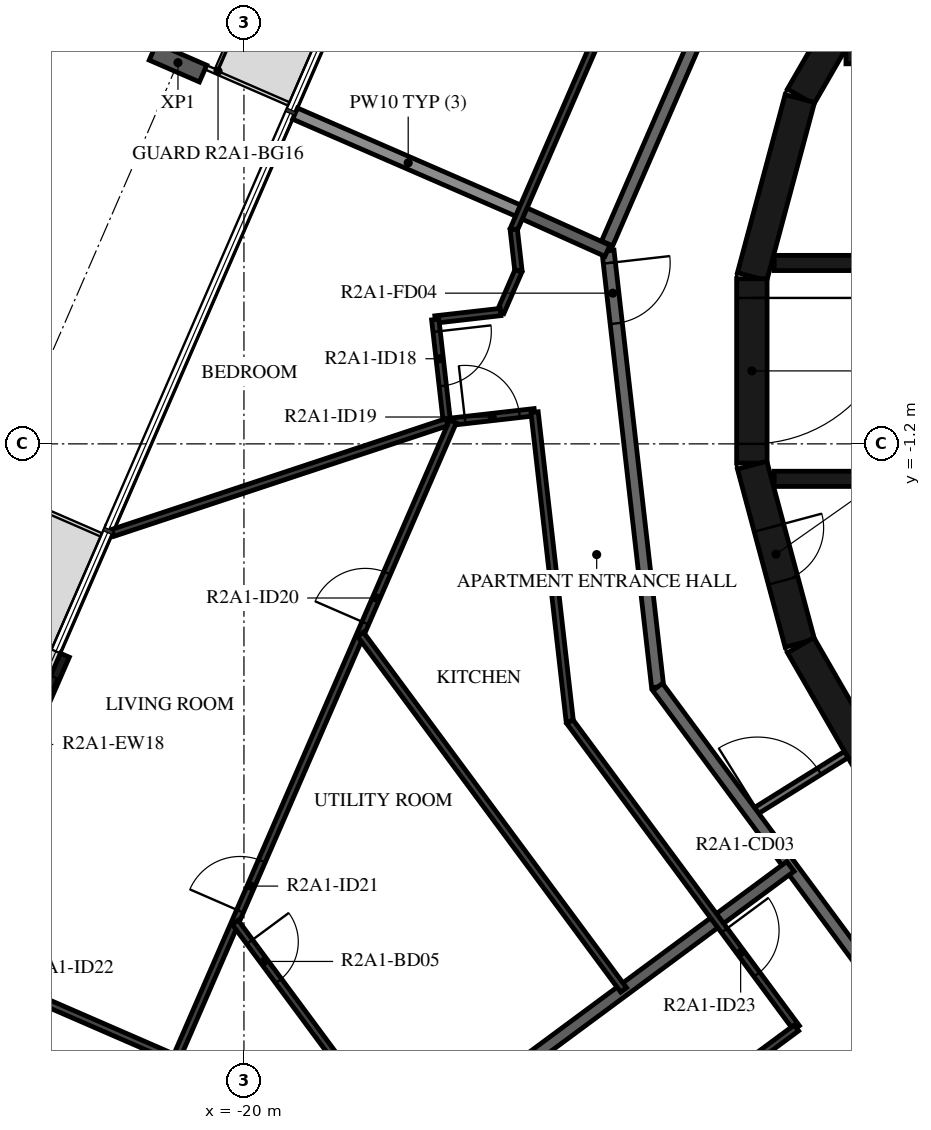
"""IFC4 building model, lengths in metres.
Left out: names, types, materials, properties, quantities, classifications, styles, units other than length and angle.
Written with IfcOpenShell. Run it as: python <this file> out.ifc"""

import sys

from ifc_helpers import new_model, si_unit, direction, frame, frame_2d, origin, origin_2d, place, context, subcontext, project, spatial, rectangle, i_section, extrude, element, fill, save


model = new_model("IFC4")
c1 = context("Model", 3, precision=1e-05, world=origin(), true_north=direction((0.0, 1.0)))
c2 = subcontext(c1, "Body", "Model", "MODEL_VIEW")
j1 = project(units=[si_unit("LENGTHUNIT", "METRE"), si_unit("PLANEANGLEUNIT", "RADIAN")], contexts=[c1])
p1 = place(None, origin())
s1 = spatial("IfcSite", under=j1, at=p1, CompositionType="ELEMENT")
p2 = place(p1, origin())
s2 = spatial("IfcBuilding", under=s1, at=p2, CompositionType="ELEMENT")
p3 = place(p2, frame((0.0, 0.0, 80.2)))
s3 = spatial("IfcBuildingStorey", under=s2, at=p3, CompositionType="ELEMENT", Elevation=80.2)
p4 = place(p3, frame((-21.085, 5.069, -0.38), z_axis=(0.0, 0.0, 1.0), x_axis=(0.398749038162, 0.917060087761, 0.0)))
e1 = element("IfcColumn", 1, at=p4, inside=s3, PredefinedType="COLUMN", context=c2, shape_type="SweptSolid", body=[
    extrude(i_section(OverallWidth=0.3, OverallDepth=0.9, WebThickness=0.019, FlangeThickness=0.035, FilletRadius=0.03, at=origin_2d()), origin(), (0.0, 0.0, 1.0), 3.5),
])
p5 = place(p3, frame((-22.945, -4.676, 0.0), z_axis=(0.0, 0.0, 1.0), x_axis=(-0.398784695066, -0.917044582876, 0.0)))
e2 = element("IfcWall", 2, at=p5, inside=s3, PredefinedType="STANDARD", context=c2, shape_type="SweptSolid", body=[
    extrude(rectangle(XDim=3.2, YDim=0.16, at=frame_2d((1.6, 0.0))), origin(), (0.0, 0.0, 1.0), 3.12),
])
p6 = place(p5, frame((0.4, 0.0, 0.0)))
e3 = element("IfcOpeningElement", 3, at=p6, cuts=e2, PredefinedType="OPENING", context=c2, shape_type="SweptSolid", body=[
    extrude(rectangle(XDim=2.4, YDim=2.4, at=frame_2d((1.2, 1.2))), frame((0.0, 0.09, 0.0), z_axis=(0.0, -1.0, 0.0), x_axis=(1.0, 0.0, 0.0)), (0.0, 0.0, 1.0), 0.18),
])
for number, where, z_axis, x_axis in (
    (4, (-9.329, 7.137, 0.0), (0.0, 0.0, 1.0), (-0.5, -0.866, 0.0)),
    (5, (-10.858, 4.479, 0.0), (0.0, 0.0, 1.0), (-0.259, -0.966, 0.0)),
):
    element("IfcWall", number, at=place(p3, frame(where, z_axis=z_axis, x_axis=x_axis)), inside=s3, PredefinedType="SHEAR", context=c2, shape_type="SweptSolid", body=[
        extrude(rectangle(XDim=3.033, YDim=0.5, at=frame_2d((1.516, 0.0))), origin(), (0.0, 0.0, 1.0), 3.12),
    ])
p7 = place(p3, frame((-11.647, 1.516, 0.0), z_axis=(0.0, 0.0, 1.0), x_axis=(0.0, -1.0, 0.0)))
e6 = element("IfcWall", 6, at=p7, inside=s3, PredefinedType="SHEAR", context=c2, shape_type="SweptSolid", body=[
    extrude(rectangle(XDim=3.033, YDim=0.5, at=frame_2d((1.516, 0.0))), origin(), (0.0, 0.0, 1.0), 3.12),
])
p8 = place(p7, frame((0.316, 0.0, 0.0)))
e7 = element("IfcOpeningElement", 7, at=p8, cuts=e6, PredefinedType="OPENING", context=c2, shape_type="SweptSolid", body=[
    extrude(rectangle(XDim=2.4, YDim=2.1, at=frame_2d((1.2, 1.05))), frame((0.0, 0.26, 0.0), z_axis=(0.0, -1.0, 0.0), x_axis=(1.0, 0.0, 0.0)), (0.0, 0.0, 1.0), 0.52),
])
p9 = place(p3, frame((-11.643, -1.55, 0.0), z_axis=(0.0, 0.0, 1.0), x_axis=(0.258734743916, -0.965948410781, 0.0)))
e8 = element("IfcWall", 8, at=p9, inside=s3, PredefinedType="SHEAR", context=c2, shape_type="SweptSolid", body=[
    extrude(rectangle(XDim=3.033, YDim=0.5, at=frame_2d((1.516, 0.0))), origin(), (0.0, 0.0, 1.0), 3.12),
])
p10 = place(p9, frame((1.066, 0.0, 0.0)))
e9 = element("IfcOpeningElement", 9, at=p10, cuts=e8, PredefinedType="OPENING", context=c2, shape_type="SweptSolid", body=[
    extrude(rectangle(XDim=0.9, YDim=2.1, at=frame_2d((0.45, 1.05))), frame((0.0, 0.26, 0.0), z_axis=(0.0, -1.0, 0.0), x_axis=(1.0, 0.0, 0.0)), (0.0, 0.0, 1.0), 0.52),
])
p11 = place(p3, frame((-10.845, -4.51, 0.0), z_axis=(0.0, 0.0, 1.0), x_axis=(0.500087131594, -0.865975092491, 0.0)))
e10 = element("IfcWall", 10, at=p11, inside=s3, PredefinedType="SHEAR", context=c2, shape_type="SweptSolid", body=[
    extrude(rectangle(XDim=3.033, YDim=0.5, at=frame_2d((1.516, 0.0))), origin(), (0.0, 0.0, 1.0), 3.12),
])
p12 = place(p3, frame((-7.0, 5.175, 0.0), z_axis=(0.0, 0.0, 1.0), x_axis=(-1.0, 0.0, 0.0)))
e11 = element("IfcWall", 11, at=p12, inside=s3, PredefinedType="SHEAR", context=c2, shape_type="SweptSolid", body=[
    extrude(rectangle(XDim=3.1, YDim=0.25, at=frame_2d((1.55, 0.0))), origin(), (0.0, 0.0, 1.0), 3.12),
])
p13 = place(p3, frame((-11.28, 1.775, 0.0), z_axis=(0.0, 0.0, 1.0), x_axis=(1.0, 0.0, 0.0)))
e12 = element("IfcWall", 12, at=p13, inside=s3, PredefinedType="SHEAR", context=c2, shape_type="SweptSolid", body=[
    extrude(rectangle(XDim=14.38, YDim=0.25, at=frame_2d((7.19, 0.0))), origin(), (0.0, 0.0, 1.0), 3.12),
])
p14 = place(p13, frame((2.13, 0.0, 0.0)))
e13 = element("IfcOpeningElement", 13, at=p14, cuts=e12, PredefinedType="OPENING", context=c2, shape_type="SweptSolid", body=[
    extrude(rectangle(XDim=1.1, YDim=2.1, at=frame_2d((0.55, 1.05))), frame((0.0, 0.135, 0.0), z_axis=(0.0, -1.0, 0.0), x_axis=(1.0, 0.0, 0.0)), (0.0, 0.0, 1.0), 0.27),
])
p15 = place(p13, frame((4.28, 0.0, 0.0)))
e14 = element("IfcOpeningElement", 14, at=p15, cuts=e12, PredefinedType="OPENING", context=c2, shape_type="SweptSolid", body=[
    extrude(rectangle(XDim=1.1, YDim=2.1, at=frame_2d((0.55, 1.05))), frame((0.0, 0.135, 0.0), z_axis=(0.0, -1.0, 0.0), x_axis=(1.0, 0.0, 0.0)), (0.0, 0.0, 1.0), 0.27),
])
p16 = place(p13, frame((6.43, 0.0, 0.0)))
e15 = element("IfcOpeningElement", 15, at=p16, cuts=e12, PredefinedType="OPENING", context=c2, shape_type="SweptSolid", body=[
    extrude(rectangle(XDim=1.1, YDim=2.1, at=frame_2d((0.55, 1.05))), frame((0.0, 0.135, 0.0), z_axis=(0.0, -1.0, 0.0), x_axis=(1.0, 0.0, 0.0)), (0.0, 0.0, 1.0), 0.27),
])
p17 = place(p13, frame((8.58, 0.0, 0.0)))
e16 = element("IfcOpeningElement", 16, at=p17, cuts=e12, PredefinedType="OPENING", context=c2, shape_type="SweptSolid", body=[
    extrude(rectangle(XDim=1.1, YDim=2.1, at=frame_2d((0.55, 1.05))), frame((0.0, 0.135, 0.0), z_axis=(0.0, -1.0, 0.0), x_axis=(1.0, 0.0, 0.0)), (0.0, 0.0, 1.0), 0.27),
])
p18 = place(p13, frame((11.905, 0.0, 0.0)))
e17 = element("IfcOpeningElement", 17, at=p18, cuts=e12, PredefinedType="OPENING", context=c2, shape_type="SweptSolid", body=[
    extrude(rectangle(XDim=0.9, YDim=2.1, at=frame_2d((0.45, 1.05))), frame((0.0, 0.135, 0.0), z_axis=(0.0, -1.0, 0.0), x_axis=(1.0, 0.0, 0.0)), (0.0, 0.0, 1.0), 0.27),
])
p19 = place(p3, frame((-11.28, -1.775, 0.0), z_axis=(0.0, 0.0, 1.0), x_axis=(1.0, 0.0, 0.0)))
e18 = element("IfcWall", 18, at=p19, inside=s3, PredefinedType="SHEAR", context=c2, shape_type="SweptSolid", body=[
    extrude(rectangle(XDim=14.38, YDim=0.25, at=frame_2d((7.19, 0.0))), origin(), (0.0, 0.0, 1.0), 3.12),
])
p20 = place(p19, frame((7.605, 0.0, 0.0)))
e19 = element("IfcOpeningElement", 19, at=p20, cuts=e18, PredefinedType="OPENING", context=c2, shape_type="SweptSolid", body=[
    extrude(rectangle(XDim=0.9, YDim=2.1, at=frame_2d((0.45, 1.05))), frame((0.0, 0.135, 0.0), z_axis=(0.0, -1.0, 0.0), x_axis=(1.0, 0.0, 0.0)), (0.0, 0.0, 1.0), 0.27),
])
p21 = place(p19, frame((10.83, 0.0, 0.0)))
e20 = element("IfcOpeningElement", 20, at=p21, cuts=e18, PredefinedType="OPENING", context=c2, shape_type="SweptSolid", body=[
    extrude(rectangle(XDim=0.9, YDim=2.1, at=frame_2d((0.45, 1.05))), frame((0.0, 0.135, 0.0), z_axis=(0.0, -1.0, 0.0), x_axis=(1.0, 0.0, 0.0)), (0.0, 0.0, 1.0), 0.27),
])
p22 = place(p19, frame((12.98, 0.0, 0.0)))
e21 = element("IfcOpeningElement", 21, at=p22, cuts=e18, PredefinedType="OPENING", context=c2, shape_type="SweptSolid", body=[
    extrude(rectangle(XDim=0.9, YDim=2.1, at=frame_2d((0.45, 1.05))), frame((0.0, 0.135, 0.0), z_axis=(0.0, -1.0, 0.0), x_axis=(1.0, 0.0, 0.0)), (0.0, 0.0, 1.0), 0.27),
])
p23 = place(p3, frame((-11.654, -7.282, 0.0), z_axis=(0.0, 0.0, 1.0), x_axis=(0.848117698675, 0.529807860638, 0.0)))
e22 = element("IfcWall", 22, at=p23, inside=s3, PredefinedType="PARTITIONING", context=c2, shape_type="SweptSolid", body=[
    extrude(rectangle(XDim=1.838, YDim=0.12, at=frame_2d((0.919, 0.0))), origin(), (0.0, 0.0, 1.0), 3.12),
])
p24 = place(p23, frame((0.115, 0.0, 0.0)))
e23 = element("IfcOpeningElement", 23, at=p24, cuts=e22, PredefinedType="OPENING", context=c2, shape_type="SweptSolid", body=[
    extrude(rectangle(XDim=1.2, YDim=2.1, at=frame_2d((0.6, 1.05))), frame((0.0, 0.07, 0.0), z_axis=(0.0, -1.0, 0.0), x_axis=(1.0, 0.0, 0.0)), (0.0, 0.0, 1.0), 0.14),
])
p25 = place(p3, frame((-11.1, 8.829, 0.0), z_axis=(0.0, 0.0, 1.0), x_axis=(-0.398741918631, -0.917063183388, 0.0)))
e24 = element("IfcWall", 24, at=p25, inside=s3, PredefinedType="STANDARD", context=c2, shape_type="SweptSolid", body=[
    extrude(rectangle(XDim=7.342, YDim=0.2, at=frame_2d((3.671, 0.0))), origin(), (0.0, 0.0, 1.0), 3.12),
])
p26 = place(p3, frame((-14.013, 1.974, 0.0), z_axis=(0.0, 0.0, 1.0), x_axis=(0.113196526349, -0.993572617589, 0.0)))
e25 = element("IfcWall", 25, at=p26, inside=s3, PredefinedType="STANDARD", context=c2, shape_type="SweptSolid", body=[
    extrude(rectangle(XDim=7.219, YDim=0.2, at=frame_2d((3.609, 0.0))), origin(), (0.0, 0.0, 1.0), 3.12),
])
p27 = place(p26, frame((0.2, 0.0, 0.0)))
e26 = element("IfcOpeningElement", 26, at=p27, cuts=e25, PredefinedType="OPENING", context=c2, shape_type="SweptSolid", body=[
    extrude(rectangle(XDim=1.0, YDim=2.1, at=frame_2d((0.5, 1.05))), frame((0.0, 0.11, 0.0), z_axis=(0.0, -1.0, 0.0), x_axis=(1.0, 0.0, 0.0)), (0.0, 0.0, 1.0), 0.22),
])
p28 = place(p3, frame((-13.196, -5.198, 0.0), z_axis=(0.0, 0.0, 1.0), x_axis=(0.594805187394, -0.803869883159, 0.0)))
e27 = element("IfcWall", 27, at=p28, inside=s3, PredefinedType="STANDARD", context=c2, shape_type="SweptSolid", body=[
    extrude(rectangle(XDim=7.342, YDim=0.2, at=frame_2d((3.671, 0.0))), origin(), (0.0, 0.0, 1.0), 3.12),
])
p29 = place(p3, frame((-15.439, 2.613, 0.0), z_axis=(0.0, 0.0, 1.0), x_axis=(0.911830308819, -0.410567275752, 0.0)))
e28 = element("IfcWall", 28, at=p29, inside=s3, PredefinedType="STANDARD", context=c2, shape_type="SweptSolid", body=[
    extrude(rectangle(XDim=1.553, YDim=0.2, at=frame_2d((0.777, 0.0))), origin(), (0.0, 0.0, 1.0), 3.12),
])
p30 = place(p3, frame((-19.159, 4.231, 0.0), z_axis=(0.0, 0.0, 1.0), x_axis=(0.91704996524, -0.398772317562, 0.0)))
e29 = element("IfcWall", 29, at=p30, inside=s3, PredefinedType="STANDARD", context=c2, shape_type="SweptSolid", body=[
    extrude(rectangle(XDim=4.057, YDim=0.2, at=frame_2d((2.029, 0.0))), origin(), (0.0, 0.0, 1.0), 2.73),
])
p31 = place(p3, frame((-15.41, -11.403, 0.0), z_axis=(0.0, 0.0, 1.0), x_axis=(0.803887568227, 0.594781285558, 0.0)))
e30 = element("IfcWall", 30, at=p31, inside=s3, PredefinedType="STANDARD", context=c2, shape_type="SweptSolid", body=[
    extrude(rectangle(XDim=5.47, YDim=0.2, at=frame_2d((2.735, 0.0))), origin(), (0.0, 0.0, 1.0), 3.12),
])
p32 = place(p3, frame((-14.049, 5.81, 0.0), z_axis=(0.0, 0.0, 1.0), x_axis=(-0.398707311688, -0.917078229818, 0.0)))
e31 = element("IfcWall", 31, at=p32, inside=s3, PredefinedType="PARTITIONING", context=c2, shape_type="SweptSolid", body=[
    extrude(rectangle(XDim=3.799, YDim=0.12, at=frame_2d((1.899, 0.0))), origin(), (0.0, 0.0, 1.0), 3.12),
])
p33 = place(p3, frame((-15.563, 2.326, 0.0), z_axis=(0.0, 0.0, 1.0), x_axis=(0.113013677091, -0.993593432341, 0.0)))
e32 = element("IfcWall", 32, at=p33, inside=s3, PredefinedType="PARTITIONING", context=c2, shape_type="SweptSolid", body=[
    extrude(rectangle(XDim=0.685, YDim=0.12, at=frame_2d((0.342, 0.0))), origin(), (0.0, 0.0, 1.0), 3.12),
])
p34 = place(p3, frame((-15.486, 1.646, 0.0), z_axis=(0.0, 0.0, 1.0), x_axis=(-0.398701933952, -0.917080567814, 0.0)))
e33 = element("IfcWall", 33, at=p34, inside=s3, PredefinedType="PARTITIONING", context=c2, shape_type="SweptSolid", body=[
    extrude(rectangle(XDim=0.739, YDim=0.12, at=frame_2d((0.369, 0.0))), origin(), (0.0, 0.0, 1.0), 3.12),
])
p35 = place(p3, frame((-15.78, 0.968, 0.0), z_axis=(0.0, 0.0, 1.0), x_axis=(-0.99355448905, -0.113355534887, 0.0)))
e34 = element("IfcWall", 34, at=p35, inside=s3, PredefinedType="PARTITIONING", context=c2, shape_type="SweptSolid", body=[
    extrude(rectangle(XDim=1.081, YDim=0.12, at=frame_2d((0.541, 0.0))), origin(), (0.0, 0.0, 1.0), 3.12),
])
p36 = place(p3, frame((-16.854, 0.846, 0.0), z_axis=(0.0, 0.0, 1.0), x_axis=(0.113173930474, -0.993575191649, 0.0)))
e35 = element("IfcWall", 35, at=p36, inside=s3, PredefinedType="PARTITIONING", context=c2, shape_type="SweptSolid", body=[
    extrude(rectangle(XDim=1.7, YDim=0.12, at=frame_2d((0.85, 0.0))), origin(), (0.0, 0.0, 1.0), 3.12),
])
p37 = place(p36, frame((0.2, 0.0, 0.0)))
e36 = element("IfcOpeningElement", 36, at=p37, cuts=e35, PredefinedType="OPENING", context=c2, shape_type="SweptSolid", body=[
    extrude(rectangle(XDim=0.9, YDim=2.1, at=frame_2d((0.45, 1.05))), frame((0.0, 0.07, 0.0), z_axis=(0.0, -1.0, 0.0), x_axis=(1.0, 0.0, 0.0)), (0.0, 0.0, 1.0), 0.14),
])
p38 = place(p3, frame((-16.563, -0.832, 0.0), z_axis=(0.0, 0.0, 1.0), x_axis=(0.993578035261, 0.113148963084, 0.0)))
e37 = element("IfcWall", 37, at=p38, inside=s3, PredefinedType="PARTITIONING", context=c2, shape_type="SweptSolid", body=[
    extrude(rectangle(XDim=1.351, YDim=0.12, at=frame_2d((0.675, 0.0))), origin(), (0.0, 0.0, 1.0), 3.12),
])
p39 = place(p38, frame((0.2, 0.0, 0.0)))
e38 = element("IfcOpeningElement", 38, at=p39, cuts=e37, PredefinedType="OPENING", context=c2, shape_type="SweptSolid", body=[
    extrude(rectangle(XDim=0.9, YDim=2.1, at=frame_2d((0.45, 1.05))), frame((0.0, 0.07, 0.0), z_axis=(0.0, -1.0, 0.0), x_axis=(1.0, 0.0, 0.0)), (0.0, 0.0, 1.0), 0.14),
])
p40 = place(p3, frame((-15.221, -0.679, 0.0), z_axis=(0.0, 0.0, 1.0), x_axis=(0.113219875647, -0.993569957154, 0.0)))
e39 = element("IfcWall", 39, at=p40, inside=s3, PredefinedType="PARTITIONING", context=c2, shape_type="SweptSolid", body=[
    extrude(rectangle(XDim=5.121, YDim=0.12, at=frame_2d((2.561, 0.0))), origin(), (0.0, 0.0, 1.0), 3.12),
])
p41 = place(p3, frame((-14.641, -5.767, 0.0), z_axis=(0.0, 0.0, 1.0), x_axis=(0.594825885962, -0.803854567313, 0.0)))
e40 = element("IfcWall", 40, at=p41, inside=s3, PredefinedType="PARTITIONING", context=c2, shape_type="SweptSolid", body=[
    extrude(rectangle(XDim=6.266, YDim=0.12, at=frame_2d((3.133, 0.0))), origin(), (0.0, 0.0, 1.0), 3.12),
])
p42 = place(p41, frame((4.273, 0.0, 0.0)))
e41 = element("IfcOpeningElement", 41, at=p42, cuts=e40, PredefinedType="OPENING", context=c2, shape_type="SweptSolid", body=[
    extrude(rectangle(XDim=0.9, YDim=2.1, at=frame_2d((0.45, 1.05))), frame((0.0, 0.07, 0.0), z_axis=(0.0, -1.0, 0.0), x_axis=(1.0, 0.0, 0.0)), (0.0, 0.0, 1.0), 0.14),
])
p43 = place(p3, frame((-22.157, -2.664, 0.0), z_axis=(0.0, 0.0, 1.0), x_axis=(0.949263673698, 0.314481283698, 0.0)))
e42 = element("IfcWall", 42, at=p43, inside=s3, PredefinedType="PARTITIONING", context=c2, shape_type="SweptSolid", body=[
    extrude(rectangle(XDim=5.789, YDim=0.12, at=frame_2d((2.895, 0.0))), origin(), (0.0, 0.0, 1.0), 3.12),
])
p44 = place(p3, frame((-21.298, -11.722, 0.0), z_axis=(0.0, 0.0, 1.0), x_axis=(0.398737387658, 0.917065153456, 0.0)))
e43 = element("IfcWall", 43, at=p44, inside=s3, PredefinedType="PARTITIONING", context=c2, shape_type="SweptSolid", body=[
    extrude(rectangle(XDim=11.875, YDim=0.12, at=frame_2d((5.938, 0.0))), origin(), (0.0, 0.0, 1.0), 3.12),
])
p45 = place(p44, frame((8.26, 0.0, 0.0)))
e44 = element("IfcOpeningElement", 44, at=p45, cuts=e43, PredefinedType="OPENING", context=c2, shape_type="SweptSolid", body=[
    extrude(rectangle(XDim=0.9, YDim=2.1, at=frame_2d((0.45, 1.05))), frame((0.0, 0.07, 0.0), z_axis=(0.0, -1.0, 0.0), x_axis=(1.0, 0.0, 0.0)), (0.0, 0.0, 1.0), 0.14),
])
p46 = place(p44, frame((3.094, 0.0, 0.0)))
e45 = element("IfcOpeningElement", 45, at=p46, cuts=e43, PredefinedType="OPENING", context=c2, shape_type="SweptSolid", body=[
    extrude(rectangle(XDim=0.9, YDim=2.1, at=frame_2d((0.45, 1.05))), frame((0.0, 0.07, 0.0), z_axis=(0.0, -1.0, 0.0), x_axis=(1.0, 0.0, 0.0)), (0.0, 0.0, 1.0), 0.14),
])
p47 = place(p3, frame((-25.156, -9.559, 0.0), z_axis=(0.0, 0.0, 1.0), x_axis=(0.917042707292, -0.398789008127, 0.0)))
e46 = element("IfcWall", 46, at=p47, inside=s3, PredefinedType="PARTITIONING", context=c2, shape_type="SweptSolid", body=[
    extrude(rectangle(XDim=4.4, YDim=0.12, at=frame_2d((2.2, 0.0))), origin(), (0.0, 0.0, 1.0), 2.73),
])
p48 = place(p47, frame((0.2, 0.0, 0.0)))
e47 = element("IfcOpeningElement", 47, at=p48, cuts=e46, PredefinedType="OPENING", context=c2, shape_type="SweptSolid", body=[
    extrude(rectangle(XDim=0.9, YDim=2.1, at=frame_2d((0.45, 1.05))), frame((0.0, 0.07, 0.0), z_axis=(0.0, -1.0, 0.0), x_axis=(1.0, 0.0, 0.0)), (0.0, 0.0, 1.0), 0.14),
])
p49 = place(p3, frame((-18.084, -4.331, 0.0), z_axis=(0.0, 0.0, 1.0), x_axis=(0.594811782108, -0.803865003508, 0.0)))
e48 = element("IfcWall", 48, at=p49, inside=s3, PredefinedType="PARTITIONING", context=c2, shape_type="SweptSolid", body=[
    extrude(rectangle(XDim=7.276, YDim=0.12, at=frame_2d((3.638, 0.0))), origin(), (0.0, 0.0, 1.0), 3.12),
])
p50 = place(p3, frame((-20.144, -9.068, 0.0), z_axis=(0.0, 0.0, 1.0), x_axis=(0.59487477233, -0.803818390711, 0.0)))
e49 = element("IfcWall", 49, at=p50, inside=s3, PredefinedType="PARTITIONING", context=c2, shape_type="SweptSolid", body=[
    extrude(rectangle(XDim=3.575, YDim=0.12, at=frame_2d((1.788, 0.0))), origin(), (0.0, 0.0, 1.0), 3.12),
])
p51 = place(p50, frame((0.4, 0.0, 0.0)))
e50 = element("IfcOpeningElement", 50, at=p51, cuts=e49, PredefinedType="OPENING", context=c2, shape_type="SweptSolid", body=[
    extrude(rectangle(XDim=0.8, YDim=2.1, at=frame_2d((0.4, 1.05))), frame((0.0, 0.07, 0.0), z_axis=(0.0, -1.0, 0.0), x_axis=(1.0, 0.0, 0.0)), (0.0, 0.0, 1.0), 0.14),
])
p52 = place(p3, frame((-10.914, -10.804, 0.0), z_axis=(0.0, 0.0, 1.0), x_axis=(-0.803864616889, -0.594812304609, 0.0)))
e51 = element("IfcWall", 51, at=p52, inside=s3, PredefinedType="PARTITIONING", context=c2, shape_type="SweptSolid", body=[
    extrude(rectangle(XDim=4.008, YDim=0.12, at=frame_2d((2.004, 0.0))), origin(), (0.0, 0.0, 1.0), 3.12),
])
p53 = place(p6, origin())
e52 = element("IfcDoor", 52, at=p53, inside=s3, OperationType="DOUBLE_DOOR_SLIDING", PredefinedType="DOOR", context=c2, shape_type="SweptSolid", body=[
    extrude(rectangle(XDim=2.4, YDim=2.4, at=frame_2d((1.2, 1.2))), frame((0.0, 0.025, 0.0), z_axis=(0.0, -1.0, 0.0), x_axis=(1.0, 0.0, 0.0)), (0.0, 0.0, 1.0), 0.05),
])
fill(e3, e52)
p54 = place(p8, origin())
e53 = element("IfcDoor", 53, at=p54, inside=s3, OperationType="DOUBLE_DOOR_SINGLE_SWING", PredefinedType="DOOR", context=c2, shape_type="SweptSolid", body=[
    extrude(rectangle(XDim=2.4, YDim=2.1, at=frame_2d((1.2, 1.05))), frame((0.0, 0.025, 0.0), z_axis=(0.0, -1.0, 0.0), x_axis=(1.0, 0.0, 0.0)), (0.0, 0.0, 1.0), 0.05),
])
fill(e7, e53)
p55 = place(p10, origin())
e54 = element("IfcDoor", 54, at=p55, inside=s3, OperationType="SINGLE_SWING_LEFT", PredefinedType="DOOR", context=c2, shape_type="SweptSolid", body=[
    extrude(rectangle(XDim=0.9, YDim=2.1, at=frame_2d((0.45, 1.05))), frame((0.0, 0.025, 0.0), z_axis=(0.0, -1.0, 0.0), x_axis=(1.0, 0.0, 0.0)), (0.0, 0.0, 1.0), 0.05),
])
fill(e9, e54)
p56 = place(p27, origin())
e55 = element("IfcDoor", 55, at=p56, inside=s3, OperationType="SINGLE_SWING_RIGHT", PredefinedType="DOOR", context=c2, shape_type="SweptSolid", body=[
    extrude(rectangle(XDim=1.0, YDim=2.1, at=frame_2d((0.5, 1.05))), frame((0.0, 0.025, 0.0), z_axis=(0.0, -1.0, 0.0), x_axis=(1.0, 0.0, 0.0)), (0.0, 0.0, 1.0), 0.05),
])
fill(e26, e55)
p57 = place(p37, origin())
e56 = element("IfcDoor", 56, at=p57, inside=s3, OperationType="SINGLE_SWING_RIGHT", PredefinedType="DOOR", context=c2, shape_type="SweptSolid", body=[
    extrude(rectangle(XDim=0.9, YDim=2.1, at=frame_2d((0.45, 1.05))), frame((0.0, 0.025, 0.0), z_axis=(0.0, -1.0, 0.0), x_axis=(1.0, 0.0, 0.0)), (0.0, 0.0, 1.0), 0.05),
])
fill(e36, e56)
p58 = place(p39, origin())
e57 = element("IfcDoor", 57, at=p58, inside=s3, OperationType="SINGLE_SWING_LEFT", PredefinedType="DOOR", context=c2, shape_type="SweptSolid", body=[
    extrude(rectangle(XDim=0.9, YDim=2.1, at=frame_2d((0.45, 1.05))), frame((0.0, 0.025, 0.0), z_axis=(0.0, -1.0, 0.0), x_axis=(1.0, 0.0, 0.0)), (0.0, 0.0, 1.0), 0.05),
])
fill(e38, e57)
p59 = place(p45, origin())
e58 = element("IfcDoor", 58, at=p59, inside=s3, OperationType="SINGLE_SWING_RIGHT", PredefinedType="DOOR", context=c2, shape_type="SweptSolid", body=[
    extrude(rectangle(XDim=0.9, YDim=2.1, at=frame_2d((0.45, 1.05))), frame((0.0, 0.025, 0.0), z_axis=(0.0, -1.0, 0.0), x_axis=(1.0, 0.0, 0.0)), (0.0, 0.0, 1.0), 0.05),
])
fill(e44, e58)
p60 = place(p46, origin())
e59 = element("IfcDoor", 59, at=p60, inside=s3, OperationType="SINGLE_SWING_LEFT", PredefinedType="DOOR", context=c2, shape_type="SweptSolid", body=[
    extrude(rectangle(XDim=0.9, YDim=2.1, at=frame_2d((0.45, 1.05))), frame((0.0, 0.025, 0.0), z_axis=(0.0, -1.0, 0.0), x_axis=(1.0, 0.0, 0.0)), (0.0, 0.0, 1.0), 0.05),
])
fill(e45, e59)
p61 = place(p51, origin())
e60 = element("IfcDoor", 60, at=p61, inside=s3, OperationType="SINGLE_SWING_RIGHT", PredefinedType="DOOR", context=c2, shape_type="SweptSolid", body=[
    extrude(rectangle(XDim=0.8, YDim=2.1, at=frame_2d((0.4, 1.05))), frame((0.0, 0.025, 0.0), z_axis=(0.0, -1.0, 0.0), x_axis=(1.0, 0.0, 0.0)), (0.0, 0.0, 1.0), 0.05),
])
fill(e50, e60)
p62 = place(p42, origin())
e61 = element("IfcDoor", 61, at=p62, inside=s3, OperationType="SINGLE_SWING_LEFT", PredefinedType="DOOR", context=c2, shape_type="SweptSolid", body=[
    extrude(rectangle(XDim=0.9, YDim=2.1, at=frame_2d((0.45, 1.05))), frame((0.0, 0.025, 0.0), z_axis=(0.0, -1.0, 0.0), x_axis=(1.0, 0.0, 0.0)), (0.0, 0.0, 1.0), 0.05),
])
fill(e41, e61)
p63 = place(p24, origin())
e62 = element("IfcDoor", 62, at=p63, inside=s3, OperationType="DOUBLE_DOOR_SINGLE_SWING", PredefinedType="DOOR", context=c2, shape_type="SweptSolid", body=[
    extrude(rectangle(XDim=1.2, YDim=2.1, at=frame_2d((0.6, 1.05))), frame((0.0, 0.025, 0.0), z_axis=(0.0, -1.0, 0.0), x_axis=(1.0, 0.0, 0.0)), (0.0, 0.0, 1.0), 0.05),
])
fill(e23, e62)
save(model, sys.argv[1])
